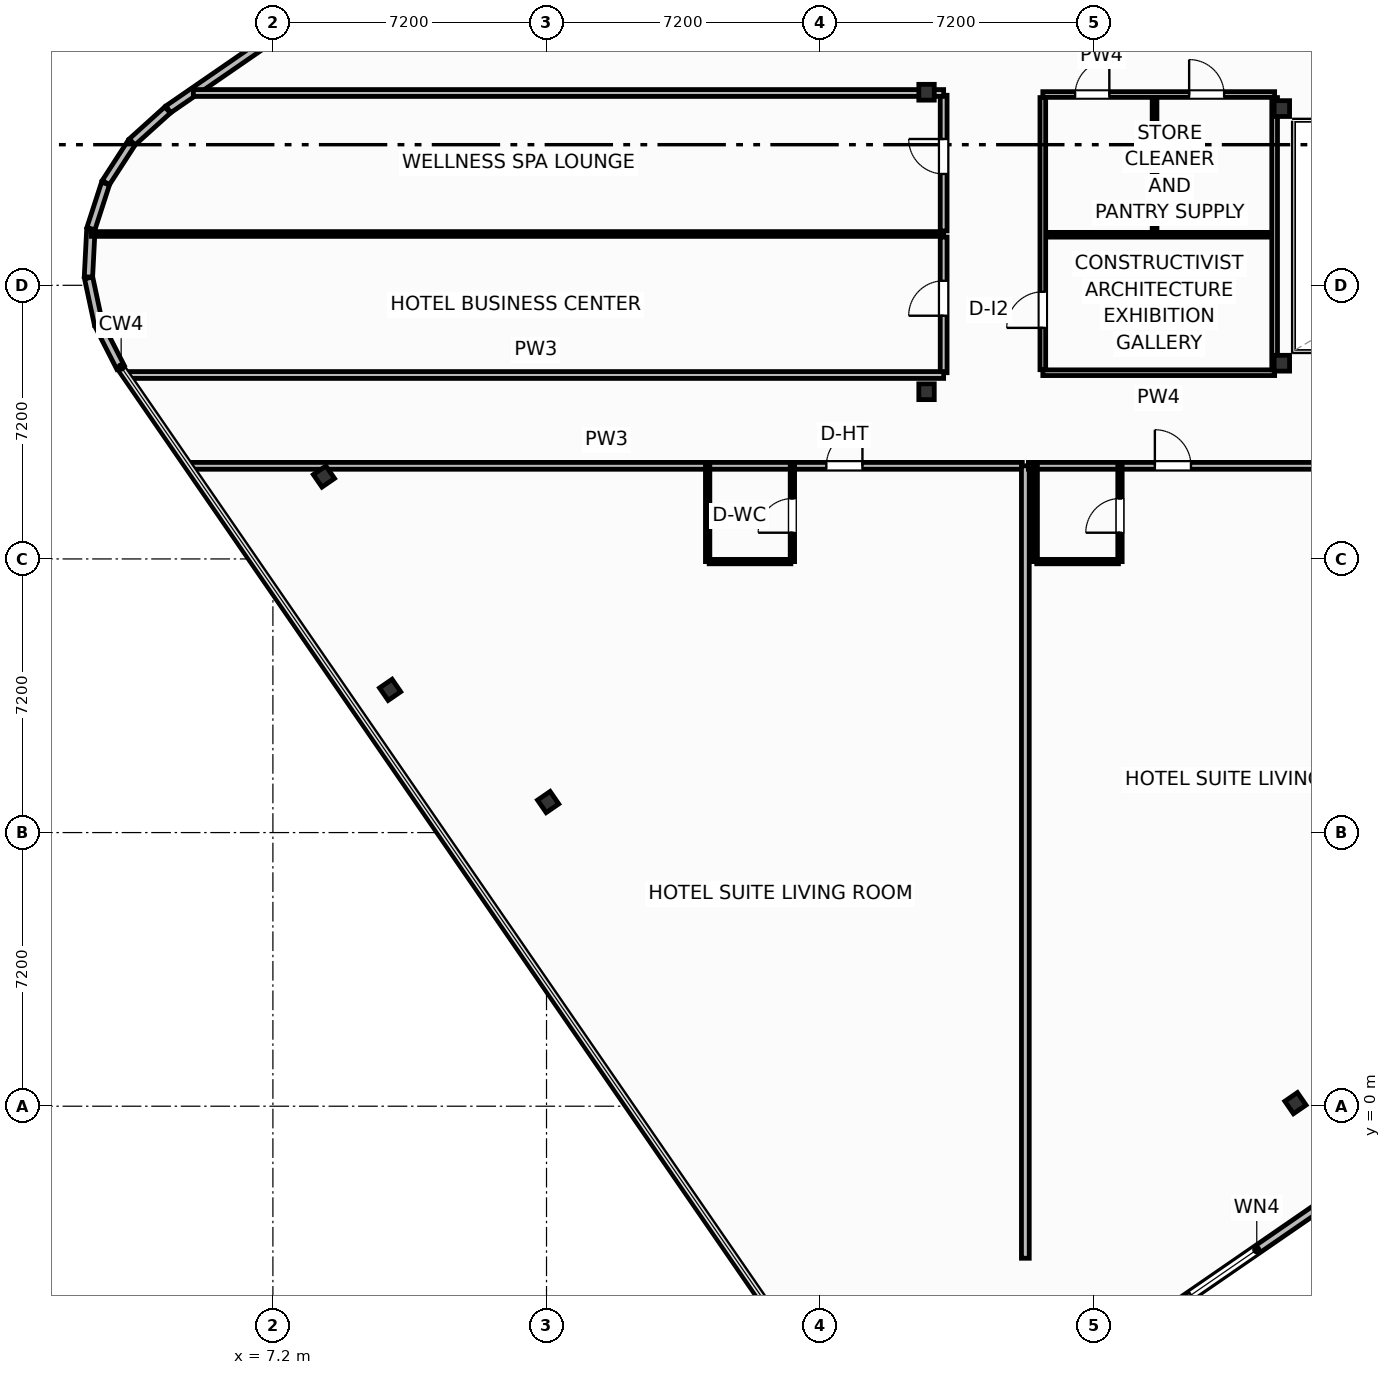
"""IFC4 building model, lengths in metres.
Left out: names, types, materials, properties, quantities, classifications, styles, units other than length and angle.
Written with IfcOpenShell. Run it as: python <this file> out.ifc"""

import sys

from ifc_helpers import new_model, si_unit, direction, frame, frame_2d, origin, origin_2d, place, context, subcontext, project, spatial, rectangle, i_section, extrude, element, fill, save


model = new_model("IFC4")
c1 = context("Model", 3, precision=1e-05, world=origin(), true_north=direction((0.0, 1.0)))
c2 = subcontext(c1, "Body", "Model", "MODEL_VIEW")
j1 = project(units=[si_unit("LENGTHUNIT", "METRE"), si_unit("PLANEANGLEUNIT", "RADIAN")], contexts=[c1])
p1 = place(None, origin())
s1 = spatial("IfcSite", under=j1, at=p1, CompositionType="ELEMENT")
p2 = place(p1, origin())
s2 = spatial("IfcBuilding", under=s1, at=p2, CompositionType="ELEMENT")
p3 = place(p2, frame((0.0, 0.0, 269.3)))
s3 = spatial("IfcBuildingStorey", under=s2, at=p3, CompositionType="ELEMENT", Elevation=269.3)
for number, where, z_axis, x_axis in (
    (1, (33.75, 19.55, 0.0), (0.0, 0.0, 1.0), (1.0, 0.0, 0.0)),
    (2, (33.75, 26.25, 0.0), (0.0, 0.0, 1.0), (1.0, 0.0, 0.0)),
    (3, (24.4, 18.8, 0.0), (0.0, 0.0, 1.0), (1.0, 0.0, 0.0)),
    (4, (24.4, 26.68, 0.0), (0.0, 0.0, 1.0), (1.0, 0.0, 0.0)),
):
    element("IfcColumn", number, at=place(p3, frame(where, z_axis=z_axis, x_axis=x_axis)), inside=s3, PredefinedType="COLUMN", context=c2, shape_type="SweptSolid", body=[
        extrude(i_section(OverallWidth=0.406, OverallDepth=0.416, WebThickness=0.03, FlangeThickness=0.048, FilletRadius=0.025, at=origin_2d()), origin(), (0.0, 0.0, 1.0), 3.7),
    ])
for number, where, z_axis, x_axis in (
    (5, (34.107, 0.081, 0.0), (0.0, 0.0, 1.0), (0.824, 0.567, 0.0)),
    (6, (8.543, 16.569, 0.0), (0.0, 0.0, 1.0), (0.824, 0.567, 0.0)),
    (7, (10.284, 10.956, 0.0), (0.0, 0.0, 1.0), (0.824, 0.567, 0.0)),
    (8, (14.443, 8.004, 0.0), (0.0, 0.0, 1.0), (0.824, 0.567, 0.0)),
):
    element("IfcColumn", number, at=place(p3, frame(where, z_axis=z_axis, x_axis=x_axis)), inside=s3, PredefinedType="COLUMN", context=c2, shape_type="SweptSolid", body=[
        extrude(i_section(OverallWidth=0.401, OverallDepth=0.399, WebThickness=0.025, FlangeThickness=0.04, FilletRadius=0.022, at=origin_2d()), origin(), (0.0, 0.0, 1.0), 3.7),
    ])
p4 = place(p3, frame((27.704, -7.488, 0.0), z_axis=(0.0, 0.0, 1.0), x_axis=(0.823529068157, 0.567274073003, 0.0)))
e9 = element("IfcWall", 9, at=p4, inside=s3, PredefinedType="SOLIDWALL", context=c2, shape_type="SweptSolid", body=[
    extrude(rectangle(XDim=10.98, YDim=0.22, at=frame_2d((5.49, 0.0))), origin(), (0.0, 0.0, 1.0), 2.73),
])
p5 = place(p4, frame((4.44, 0.0, 0.8)))
e10 = element("IfcOpeningElement", 10, at=p5, cuts=e9, PredefinedType="OPENING", context=c2, shape_type="SweptSolid", body=[
    extrude(rectangle(XDim=2.1, YDim=1.75, at=frame_2d((1.05, 0.875))), frame((0.0, 0.12, 0.0), z_axis=(0.0, -1.0, 0.0), x_axis=(1.0, 0.0, 0.0)), (0.0, 0.0, 1.0), 0.24),
])
p6 = place(p3, frame((13.408, 32.402, 0.0), z_axis=(0.0, 0.0, 1.0), x_axis=(-0.823527634633, -0.567276154087, 0.0)))
e11 = element("IfcWall", 11, at=p6, inside=s3, PredefinedType="SOLIDWALL", context=c2, shape_type="SweptSolid", body=[
    extrude(rectangle(XDim=10.88, YDim=0.22, at=frame_2d((5.44, 0.0))), origin(), (0.0, 0.0, 1.0), 2.73),
])
p7 = place(p6, frame((4.39, 0.0, 0.8)))
e12 = element("IfcOpeningElement", 12, at=p7, cuts=e11, PredefinedType="OPENING", context=c2, shape_type="SweptSolid", body=[
    extrude(rectangle(XDim=2.1, YDim=1.75, at=frame_2d((1.05, 0.875))), frame((0.0, 0.12, 0.0), z_axis=(0.0, -1.0, 0.0), x_axis=(1.0, 0.0, 0.0)), (0.0, 0.0, 1.0), 0.24),
])
p8 = place(p3, frame((4.429, 26.213, 0.0), z_axis=(0.0, 0.0, 1.0), x_axis=(-0.742414330744, -0.669941013453, 0.0)))
e13 = element("IfcWall", 13, at=p8, inside=s3, PredefinedType="SOLIDWALL", context=c2, shape_type="SweptSolid", body=[
    extrude(rectangle(XDim=1.257, YDim=0.22, at=frame_2d((0.628, 0.0))), origin(), (0.0, 0.0, 1.0), 2.73),
])
for number, where, z_axis, x_axis in (
    (14, (3.482, 25.351, 0.0), (0.0, 0.0, 1.0), (-0.544, -0.839, 0.0)),
    (15, (2.796, 24.279, 0.0), (0.0, 0.0, 1.0), (-0.308, -0.951, 0.0)),
    (16, (2.41, 23.066, 0.0), (0.0, 0.0, 1.0), (-0.051, -0.999, 0.0)),
):
    element("IfcWall", number, at=place(p3, frame(where, z_axis=z_axis, x_axis=x_axis)), inside=s3, PredefinedType="SOLIDWALL", context=c2, shape_type="SweptSolid", body=[
        extrude(rectangle(XDim=1.249, YDim=0.22, at=frame_2d((0.624, 0.0))), origin(), (0.0, 0.0, 1.0), 2.73),
    ])
for number, where, z_axis, x_axis in (
    (17, (2.351, 21.795, 0.0), (0.0, 0.0, 1.0), (0.209, -0.978, 0.0)),
    (18, (2.623, 20.551, 0.0), (0.0, 0.0, 1.0), (0.455, -0.891, 0.0)),
):
    element("IfcWall", number, at=place(p3, frame(where, z_axis=z_axis, x_axis=x_axis)), inside=s3, PredefinedType="SOLIDWALL", context=c2, shape_type="SweptSolid", body=[
        extrude(rectangle(XDim=1.249, YDim=0.22, at=frame_2d((0.625, 0.0))), origin(), (0.0, 0.0, 1.0), 2.73),
    ])
p9 = place(p3, frame((5.038, 16.85, 0.0), z_axis=(0.0, 0.0, 1.0), x_axis=(1.0, 0.0, 0.0)))
e19 = element("IfcWall", 19, at=p9, inside=s3, PredefinedType="PARTITIONING", context=c2, shape_type="SweptSolid", body=[
    extrude(rectangle(XDim=21.882, YDim=0.18, at=frame_2d((10.941, 0.0))), origin(), (0.0, 0.0, 1.0), 2.739),
])
p10 = place(p9, frame((16.725, 0.0, 0.0)))
e20 = element("IfcOpeningElement", 20, at=p10, cuts=e19, PredefinedType="OPENING", context=c2, shape_type="SweptSolid", body=[
    extrude(rectangle(XDim=0.95, YDim=2.15, at=frame_2d((0.475, 1.075))), frame((0.0, 0.1, 0.0), z_axis=(0.0, -1.0, 0.0), x_axis=(1.0, 0.0, 0.0)), (0.0, 0.0, 1.0), 0.2),
])
p11 = place(p3, frame((18.68, 14.33, 0.0), z_axis=(0.0, 0.0, 1.0), x_axis=(1.0, 0.0, 0.0)))
e21 = element("IfcWall", 21, at=p11, inside=s3, PredefinedType="PARTITIONING", context=c2, shape_type="SweptSolid", body=[
    extrude(rectangle(XDim=2.15, YDim=0.115, at=frame_2d((1.075, 0.0))), origin(), (0.0, 0.0, 1.0), 3.45),
])
p12 = place(p3, frame((20.87, 14.33, 0.0), z_axis=(0.0, 0.0, 1.0), x_axis=(0.0, 1.0, 0.0)))
e22 = element("IfcWall", 22, at=p12, inside=s3, PredefinedType="PARTITIONING", context=c2, shape_type="SweptSolid", body=[
    extrude(rectangle(XDim=2.52, YDim=0.115, at=frame_2d((1.26, 0.0))), origin(), (0.0, 0.0, 1.0), 3.45),
])
p13 = place(p12, frame((0.76, 0.0, 0.0)))
e23 = element("IfcOpeningElement", 23, at=p13, cuts=e22, PredefinedType="OPENING", context=c2, shape_type="SweptSolid", body=[
    extrude(rectangle(XDim=0.9, YDim=2.05, at=frame_2d((0.45, 1.025))), frame((0.0, 0.067, 0.0), z_axis=(0.0, -1.0, 0.0), x_axis=(1.0, 0.0, 0.0)), (0.0, 0.0, 1.0), 0.135),
])
p14 = place(p3, frame((18.64, 14.33, 0.0), z_axis=(0.0, 0.0, 1.0), x_axis=(0.0, 1.0, 0.0)))
e24 = element("IfcWall", 24, at=p14, inside=s3, PredefinedType="PARTITIONING", context=c2, shape_type="SweptSolid", body=[
    extrude(rectangle(XDim=2.52, YDim=0.115, at=frame_2d((1.26, 0.0))), origin(), (0.0, 0.0, 1.0), 3.45),
])
p15 = place(p3, frame((27.0, -4.0, 0.0), z_axis=(0.0, 0.0, 1.0), x_axis=(0.0, 1.0, 0.0)))
e25 = element("IfcWall", 25, at=p15, inside=s3, PredefinedType="PARTITIONING", context=c2, shape_type="SweptSolid", body=[
    extrude(rectangle(XDim=20.85, YDim=0.205, at=frame_2d((10.425, 0.0))), origin(), (0.0, 0.0, 1.0), 3.45),
])
p16 = place(p3, frame((27.08, 16.85, 0.0), z_axis=(0.0, 0.0, 1.0), x_axis=(1.0, 0.0, 0.0)))
e26 = element("IfcWall", 26, at=p16, inside=s3, PredefinedType="PARTITIONING", context=c2, shape_type="SweptSolid", body=[
    extrude(rectangle(XDim=12.04, YDim=0.18, at=frame_2d((6.02, 0.0))), origin(), (0.0, 0.0, 1.0), 3.45),
])
p17 = place(p16, frame((3.328, 0.0, 0.0)))
e27 = element("IfcOpeningElement", 27, at=p17, cuts=e26, PredefinedType="OPENING", context=c2, shape_type="SweptSolid", body=[
    extrude(rectangle(XDim=0.95, YDim=2.15, at=frame_2d((0.475, 1.075))), frame((0.0, 0.1, 0.0), z_axis=(0.0, -1.0, 0.0), x_axis=(1.0, 0.0, 0.0)), (0.0, 0.0, 1.0), 0.2),
])
p18 = place(p3, frame((27.3, 14.33, 0.0), z_axis=(0.0, 0.0, 1.0), x_axis=(1.0, 0.0, 0.0)))
e28 = element("IfcWall", 28, at=p18, inside=s3, PredefinedType="PARTITIONING", context=c2, shape_type="SweptSolid", body=[
    extrude(rectangle(XDim=2.15, YDim=0.115, at=frame_2d((1.075, 0.0))), origin(), (0.0, 0.0, 1.0), 3.45),
])
p19 = place(p3, frame((29.49, 14.33, 0.0), z_axis=(0.0, 0.0, 1.0), x_axis=(0.0, 1.0, 0.0)))
e29 = element("IfcWall", 29, at=p19, inside=s3, PredefinedType="PARTITIONING", context=c2, shape_type="SweptSolid", body=[
    extrude(rectangle(XDim=2.52, YDim=0.115, at=frame_2d((1.26, 0.0))), origin(), (0.0, 0.0, 1.0), 3.45),
])
p20 = place(p19, frame((0.76, 0.0, 0.0)))
e30 = element("IfcOpeningElement", 30, at=p20, cuts=e29, PredefinedType="OPENING", context=c2, shape_type="SweptSolid", body=[
    extrude(rectangle(XDim=0.9, YDim=2.05, at=frame_2d((0.45, 1.025))), frame((0.0, 0.067, 0.0), z_axis=(0.0, -1.0, 0.0), x_axis=(1.0, 0.0, 0.0)), (0.0, 0.0, 1.0), 0.135),
])
p21 = place(p3, frame((27.26, 14.33, 0.0), z_axis=(0.0, 0.0, 1.0), x_axis=(0.0, 1.0, 0.0)))
e31 = element("IfcWall", 31, at=p21, inside=s3, PredefinedType="PARTITIONING", context=c2, shape_type="SweptSolid", body=[
    extrude(rectangle(XDim=2.52, YDim=0.115, at=frame_2d((1.26, 0.0))), origin(), (0.0, 0.0, 1.0), 3.45),
])
p22 = place(p3, frame((24.85, 19.3, 0.0), z_axis=(0.0, 0.0, 1.0), x_axis=(0.0, 1.0, 0.0)))
e32 = element("IfcWall", 32, at=p22, inside=s3, PredefinedType="PARTITIONING", context=c2, shape_type="SweptSolid", body=[
    extrude(rectangle(XDim=3.57, YDim=0.18, at=frame_2d((1.785, 0.0))), origin(), (0.0, 0.0, 1.0), 3.45),
])
p23 = place(p22, frame((1.5, 0.0, 0.0)))
e33 = element("IfcOpeningElement", 33, at=p23, cuts=e32, PredefinedType="OPENING", context=c2, shape_type="SweptSolid", body=[
    extrude(rectangle(XDim=0.92, YDim=2.05, at=frame_2d((0.46, 1.025))), frame((0.0, 0.1, 0.0), z_axis=(0.0, -1.0, 0.0), x_axis=(1.0, 0.0, 0.0)), (0.0, 0.0, 1.0), 0.2),
])
p24 = place(p3, frame((24.85, 23.03, 0.0), z_axis=(0.0, 0.0, 1.0), x_axis=(0.0, 1.0, 0.0)))
e34 = element("IfcWall", 34, at=p24, inside=s3, PredefinedType="PARTITIONING", context=c2, shape_type="SweptSolid", body=[
    extrude(rectangle(XDim=3.57, YDim=0.18, at=frame_2d((1.785, 0.0))), origin(), (0.0, 0.0, 1.0), 3.45),
])
p25 = place(p24, frame((1.5, 0.0, 0.0)))
e35 = element("IfcOpeningElement", 35, at=p25, cuts=e34, PredefinedType="OPENING", context=c2, shape_type="SweptSolid", body=[
    extrude(rectangle(XDim=0.92, YDim=2.05, at=frame_2d((0.46, 1.025))), frame((0.0, 0.1, 0.0), z_axis=(0.0, -1.0, 0.0), x_axis=(1.0, 0.0, 0.0)), (0.0, 0.0, 1.0), 0.2),
])
p26 = place(p3, frame((2.424, 22.95, 0.0), z_axis=(0.0, 0.0, 1.0), x_axis=(1.0, 0.0, 0.0)))
e36 = element("IfcWall", 36, at=p26, inside=s3, PredefinedType="PARTITIONING", context=c2, shape_type="SweptSolid", body=[
    extrude(rectangle(XDim=22.426, YDim=0.125, at=frame_2d((11.213, 0.0))), origin(), (0.0, 0.0, 1.0), 3.45),
])
p27 = place(p3, frame((3.392, 19.24, 0.0), z_axis=(0.0, 0.0, 1.0), x_axis=(1.0, 0.0, 0.0)))
e37 = element("IfcWall", 37, at=p27, inside=s3, PredefinedType="PARTITIONING", context=c2, shape_type="SweptSolid", body=[
    extrude(rectangle(XDim=21.458, YDim=0.18, at=frame_2d((10.729, 0.0))), origin(), (0.0, 0.0, 1.0), 3.45),
])
p28 = place(p3, frame((5.107, 26.66, 0.0), z_axis=(0.0, 0.0, 1.0), x_axis=(1.0, 0.0, 0.0)))
e38 = element("IfcWall", 38, at=p28, inside=s3, PredefinedType="PARTITIONING", context=c2, shape_type="SweptSolid", body=[
    extrude(rectangle(XDim=19.743, YDim=0.18, at=frame_2d((9.872, 0.0))), origin(), (0.0, 0.0, 1.0), 2.662),
])
p29 = place(p3, frame((27.46, 19.3, 0.0), z_axis=(0.0, 0.0, 1.0), x_axis=(1.0, 0.0, 0.0)))
e39 = element("IfcWall", 39, at=p29, inside=s3, PredefinedType="PARTITIONING", context=c2, shape_type="SweptSolid", body=[
    extrude(rectangle(XDim=6.1, YDim=0.15, at=frame_2d((3.05, 0.0))), origin(), (0.0, 0.0, 1.0), 2.662),
])
p30 = place(p3, frame((27.46, 26.62, 0.0), z_axis=(0.0, 0.0, 1.0), x_axis=(1.0, 0.0, 0.0)))
e40 = element("IfcWall", 40, at=p30, inside=s3, PredefinedType="PARTITIONING", context=c2, shape_type="SweptSolid", body=[
    extrude(rectangle(XDim=6.1, YDim=0.15, at=frame_2d((3.05, 0.0))), origin(), (0.0, 0.0, 1.0), 2.662),
])
p31 = place(p30, frame((0.85, 0.0, 0.0)))
e41 = element("IfcOpeningElement", 41, at=p31, cuts=e40, PredefinedType="OPENING", context=c2, shape_type="SweptSolid", body=[
    extrude(rectangle(XDim=0.9, YDim=2.05, at=frame_2d((0.45, 1.025))), frame((0.0, 0.085, 0.0), z_axis=(0.0, -1.0, 0.0), x_axis=(1.0, 0.0, 0.0)), (0.0, 0.0, 1.0), 0.17),
])
p32 = place(p30, frame((3.85, 0.0, 0.0)))
e42 = element("IfcOpeningElement", 42, at=p32, cuts=e40, PredefinedType="OPENING", context=c2, shape_type="SweptSolid", body=[
    extrude(rectangle(XDim=0.92, YDim=2.05, at=frame_2d((0.46, 1.025))), frame((0.0, 0.085, 0.0), z_axis=(0.0, -1.0, 0.0), x_axis=(1.0, 0.0, 0.0)), (0.0, 0.0, 1.0), 0.17),
])
p33 = place(p3, frame((27.52, 22.93, 0.0), z_axis=(0.0, 0.0, 1.0), x_axis=(1.0, 0.0, 0.0)))
e43 = element("IfcWall", 43, at=p33, inside=s3, PredefinedType="PARTITIONING", context=c2, shape_type="SweptSolid", body=[
    extrude(rectangle(XDim=6.0, YDim=0.125, at=frame_2d((3.0, 0.0))), origin(), (0.0, 0.0, 1.0), 3.45),
])
p34 = place(p3, frame((30.4, 23.0, 0.0), z_axis=(0.0, 0.0, 1.0), x_axis=(0.0, 1.0, 0.0)))
e44 = element("IfcWall", 44, at=p34, inside=s3, PredefinedType="PARTITIONING", context=c2, shape_type="SweptSolid", body=[
    extrude(rectangle(XDim=3.54, YDim=0.125, at=frame_2d((1.77, 0.0))), origin(), (0.0, 0.0, 1.0), 3.45),
])
p35 = place(p3, frame((27.46, 19.38, 0.0), z_axis=(0.0, 0.0, 1.0), x_axis=(0.0, 1.0, 0.0)))
e45 = element("IfcWall", 45, at=p35, inside=s3, PredefinedType="PARTITIONING", context=c2, shape_type="SweptSolid", body=[
    extrude(rectangle(XDim=7.16, YDim=0.15, at=frame_2d((3.58, 0.0))), origin(), (0.0, 0.0, 1.0), 3.45),
])
p36 = place(p35, frame((1.1, 0.0, 0.0)))
e46 = element("IfcOpeningElement", 46, at=p36, cuts=e45, PredefinedType="OPENING", context=c2, shape_type="SweptSolid", body=[
    extrude(rectangle(XDim=0.95, YDim=2.05, at=frame_2d((0.475, 1.025))), frame((0.0, 0.085, 0.0), z_axis=(0.0, -1.0, 0.0), x_axis=(1.0, 0.0, 0.0)), (0.0, 0.0, 1.0), 0.17),
])
p37 = place(p3, frame((33.56, 19.38, 0.0), z_axis=(0.0, 0.0, 1.0), x_axis=(0.0, 1.0, 0.0)))
e47 = element("IfcWall", 47, at=p37, inside=s3, PredefinedType="PARTITIONING", context=c2, shape_type="SweptSolid", body=[
    extrude(rectangle(XDim=7.16, YDim=0.15, at=frame_2d((3.58, 0.0))), origin(), (0.0, 0.0, 1.0), 2.824),
])
p38 = place(p5, origin())
e48 = element("IfcWindow", 48, at=p38, inside=s3, PartitioningType="SINGLE_PANEL", PredefinedType="WINDOW", context=c2, shape_type="SweptSolid", body=[
    extrude(rectangle(XDim=2.1, YDim=1.75, at=frame_2d((1.05, 0.875))), frame((0.0, 0.03, 0.0), z_axis=(0.0, -1.0, 0.0), x_axis=(1.0, 0.0, 0.0)), (0.0, 0.0, 1.0), 0.06),
])
fill(e10, e48)
p39 = place(p10, origin())
e49 = element("IfcDoor", 49, at=p39, inside=s3, OperationType="SINGLE_SWING_RIGHT", PredefinedType="DOOR", context=c2, shape_type="SweptSolid", body=[
    extrude(rectangle(XDim=0.95, YDim=2.15, at=frame_2d((0.475, 1.075))), frame((0.0, 0.025, 0.0), z_axis=(0.0, -1.0, 0.0), x_axis=(1.0, 0.0, 0.0)), (0.0, 0.0, 1.0), 0.05),
])
fill(e20, e49)
p40 = place(p13, origin())
e50 = element("IfcDoor", 50, at=p40, inside=s3, OperationType="SINGLE_SWING_LEFT", PredefinedType="DOOR", context=c2, shape_type="SweptSolid", body=[
    extrude(rectangle(XDim=0.9, YDim=2.05, at=frame_2d((0.45, 1.025))), frame((0.0, 0.025, 0.0), z_axis=(0.0, -1.0, 0.0), x_axis=(1.0, 0.0, 0.0)), (0.0, 0.0, 1.0), 0.05),
])
fill(e23, e50)
p41 = place(p17, origin())
e51 = element("IfcDoor", 51, at=p41, inside=s3, OperationType="SINGLE_SWING_LEFT", PredefinedType="DOOR", context=c2, shape_type="SweptSolid", body=[
    extrude(rectangle(XDim=0.95, YDim=2.15, at=frame_2d((0.475, 1.075))), frame((0.0, 0.025, 0.0), z_axis=(0.0, -1.0, 0.0), x_axis=(1.0, 0.0, 0.0)), (0.0, 0.0, 1.0), 0.05),
])
fill(e27, e51)
p42 = place(p20, origin())
e52 = element("IfcDoor", 52, at=p42, inside=s3, OperationType="SINGLE_SWING_LEFT", PredefinedType="DOOR", context=c2, shape_type="SweptSolid", body=[
    extrude(rectangle(XDim=0.9, YDim=2.05, at=frame_2d((0.45, 1.025))), frame((0.0, 0.025, 0.0), z_axis=(0.0, -1.0, 0.0), x_axis=(1.0, 0.0, 0.0)), (0.0, 0.0, 1.0), 0.05),
])
fill(e30, e52)
p43 = place(p23, origin())
e53 = element("IfcDoor", 53, at=p43, inside=s3, OperationType="SINGLE_SWING_LEFT", PredefinedType="DOOR", context=c2, shape_type="SweptSolid", body=[
    extrude(rectangle(XDim=0.92, YDim=2.05, at=frame_2d((0.46, 1.025))), frame((0.0, 0.025, 0.0), z_axis=(0.0, -1.0, 0.0), x_axis=(1.0, 0.0, 0.0)), (0.0, 0.0, 1.0), 0.05),
])
fill(e33, e53)
p44 = place(p25, origin())
e54 = element("IfcDoor", 54, at=p44, inside=s3, OperationType="SINGLE_SWING_RIGHT", PredefinedType="DOOR", context=c2, shape_type="SweptSolid", body=[
    extrude(rectangle(XDim=0.92, YDim=2.05, at=frame_2d((0.46, 1.025))), frame((0.0, 0.025, 0.0), z_axis=(0.0, -1.0, 0.0), x_axis=(1.0, 0.0, 0.0)), (0.0, 0.0, 1.0), 0.05),
])
fill(e35, e54)
p45 = place(p31, origin())
e55 = element("IfcDoor", 55, at=p45, inside=s3, OperationType="SINGLE_SWING_RIGHT", PredefinedType="DOOR", context=c2, shape_type="SweptSolid", body=[
    extrude(rectangle(XDim=0.9, YDim=2.05, at=frame_2d((0.45, 1.025))), frame((0.0, 0.025, 0.0), z_axis=(0.0, -1.0, 0.0), x_axis=(1.0, 0.0, 0.0)), (0.0, 0.0, 1.0), 0.05),
])
fill(e41, e55)
p46 = place(p32, origin())
e56 = element("IfcDoor", 56, at=p46, inside=s3, OperationType="SINGLE_SWING_LEFT", PredefinedType="DOOR", context=c2, shape_type="SweptSolid", body=[
    extrude(rectangle(XDim=0.92, YDim=2.05, at=frame_2d((0.46, 1.025))), frame((0.0, 0.025, 0.0), z_axis=(0.0, -1.0, 0.0), x_axis=(1.0, 0.0, 0.0)), (0.0, 0.0, 1.0), 0.05),
])
fill(e42, e56)
p47 = place(p36, origin())
e57 = element("IfcDoor", 57, at=p47, inside=s3, OperationType="SINGLE_SWING_LEFT", PredefinedType="DOOR", context=c2, shape_type="SweptSolid", body=[
    extrude(rectangle(XDim=0.95, YDim=2.05, at=frame_2d((0.475, 1.025))), frame((0.0, 0.025, 0.0), z_axis=(0.0, -1.0, 0.0), x_axis=(1.0, 0.0, 0.0)), (0.0, 0.0, 1.0), 0.05),
])
fill(e46, e57)
save(model, sys.argv[1])
